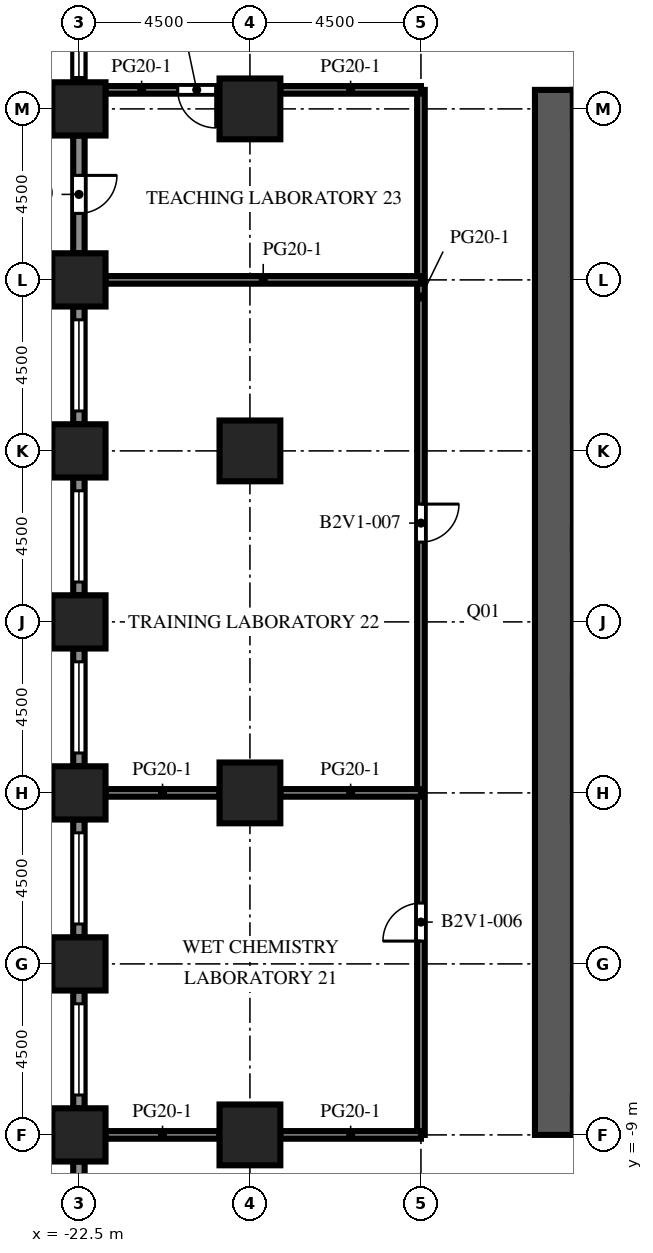
"""IFC4 building model, lengths in metres.
Left out: names, types, materials, properties, quantities, classifications, styles, units other than length and angle.
Written with IfcOpenShell. Run it as: python <this file> out.ifc"""

import sys

from ifc_helpers import new_model, si_unit, direction, frame, frame_2d, origin, origin_2d, place, context, subcontext, project, spatial, rectangle, extrude, element, fill, save


model = new_model("IFC4")
c1 = context("Model", 3, precision=1e-05, world=origin(), true_north=direction((0.0, 1.0)))
c2 = subcontext(c1, "Body", "Model", "MODEL_VIEW")
j1 = project(units=[si_unit("LENGTHUNIT", "METRE"), si_unit("PLANEANGLEUNIT", "RADIAN")], contexts=[c1])
p1 = place(None, origin())
s1 = spatial("IfcSite", under=j1, at=p1, CompositionType="ELEMENT")
p2 = place(p1, origin())
s2 = spatial("IfcBuilding", under=s1, at=p2, CompositionType="ELEMENT")
p3 = place(p2, frame((0.0, 0.0, 54.2)))
s3 = spatial("IfcBuildingStorey", under=s2, at=p3, CompositionType="ELEMENT", Elevation=54.2)
for number, where, z_axis, x_axis in (
    (1, (-22.5, -9.0, 0.0), (0.0, 0.0, 1.0), (1.0, 0.0, 0.0)),
    (2, (-22.5, -4.5, 0.0), (0.0, 0.0, 1.0), (1.0, 0.0, 0.0)),
    (3, (-22.5, 0.0, 0.0), (0.0, 0.0, 1.0), (1.0, 0.0, 0.0)),
    (4, (-22.5, 4.5, 0.0), (0.0, 0.0, 1.0), (1.0, 0.0, 0.0)),
    (5, (-22.5, 9.0, 0.0), (0.0, 0.0, 1.0), (1.0, 0.0, 0.0)),
    (6, (-22.5, 13.5, 0.0), (0.0, 0.0, 1.0), (1.0, 0.0, 0.0)),
    (7, (-22.5, 18.0, 0.0), (0.0, 0.0, 1.0), (1.0, 0.0, 0.0)),
):
    element("IfcColumn", number, at=place(p3, frame(where, z_axis=z_axis, x_axis=x_axis)), inside=s3, PredefinedType="COLUMN", context=c2, shape_type="SweptSolid", body=[
        extrude(rectangle(XDim=1.4, YDim=1.4, at=origin_2d()), origin(), (0.0, 0.0, 1.0), 4.1),
    ])
for number, where, z_axis, x_axis in (
    (8, (-18.0, -9.0, 0.0), (0.0, 0.0, 1.0), (1.0, 0.0, 0.0)),
    (9, (-18.0, 0.0, 0.0), (0.0, 0.0, 1.0), (1.0, 0.0, 0.0)),
    (10, (-18.0, 9.0, 0.0), (0.0, 0.0, 1.0), (1.0, 0.0, 0.0)),
    (11, (-18.0, 18.0, 0.0), (0.0, 0.0, 1.0), (1.0, 0.0, 0.0)),
):
    element("IfcColumn", number, at=place(p3, frame(where, z_axis=z_axis, x_axis=x_axis)), inside=s3, PredefinedType="COLUMN", context=c2, shape_type="SweptSolid", body=[
        extrude(rectangle(XDim=1.6, YDim=1.6, at=origin_2d()), origin(), (0.0, 0.0, 1.0), 4.1),
    ])
p4 = place(p3, frame((-10.0, -9.0, 0.0), z_axis=(0.0, 0.0, 1.0), x_axis=(0.0, 1.0, 0.0)))
e12 = element("IfcWall", 12, at=p4, inside=s3, PredefinedType="SHEAR", context=c2, shape_type="SweptSolid", body=[
    extrude(rectangle(XDim=27.5, YDim=1.0, at=frame_2d((13.75, 0.0))), origin(), (0.0, 0.0, 1.0), 4.1),
])
p5 = place(p4, frame((12.55, 0.0, 0.0)))
e13 = element("IfcOpeningElement", 13, at=p5, cuts=e12, PredefinedType="OPENING", context=c2, shape_type="SweptSolid", body=[
    extrude(rectangle(XDim=2.4, YDim=2.4, at=frame_2d((1.2, 1.2))), frame((0.0, 0.51, 0.0), z_axis=(0.0, -1.0, 0.0), x_axis=(1.0, 0.0, 0.0)), (0.0, 0.0, 1.0), 1.02),
])
p6 = place(p4, frame((6.825, 0.0, 0.0)))
e14 = element("IfcOpeningElement", 14, at=p6, cuts=e12, PredefinedType="OPENING", context=c2, shape_type="SweptSolid", body=[
    extrude(rectangle(XDim=1.2, YDim=2.1, at=frame_2d((0.6, 1.05))), frame((0.0, 0.51, 0.0), z_axis=(0.0, -1.0, 0.0), x_axis=(1.0, 0.0, 0.0)), (0.0, 0.0, 1.0), 1.02),
])
p7 = place(p4, frame((19.475, 0.0, 0.0)))
e15 = element("IfcOpeningElement", 15, at=p7, cuts=e12, PredefinedType="OPENING", context=c2, shape_type="SweptSolid", body=[
    extrude(rectangle(XDim=1.2, YDim=2.1, at=frame_2d((0.6, 1.05))), frame((0.0, 0.51, 0.0), z_axis=(0.0, -1.0, 0.0), x_axis=(1.0, 0.0, 0.0)), (0.0, 0.0, 1.0), 1.02),
])
p8 = place(p3, frame((-22.5, 18.7, 0.0), z_axis=(0.0, 0.0, 1.0), x_axis=(0.0, 1.0, 0.0)))
e16 = element("IfcWall", 16, at=p8, inside=s3, PredefinedType="SOLIDWALL", context=c2, shape_type="SweptSolid", body=[
    extrude(rectangle(XDim=3.1, YDim=0.3, at=frame_2d((1.55, 0.0))), origin(), (0.0, 0.0, 1.0), 2.75),
])
p9 = place(p8, frame((0.125, 0.0, 0.8)))
e17 = element("IfcOpeningElement", 17, at=p9, cuts=e16, PredefinedType="OPENING", context=c2, shape_type="SweptSolid", body=[
    extrude(rectangle(XDim=2.4, YDim=1.7, at=frame_2d((1.2, 0.85))), frame((0.0, 0.16, 0.0), z_axis=(0.0, -1.0, 0.0), x_axis=(1.0, 0.0, 0.0)), (0.0, 0.0, 1.0), 0.32),
])
p10 = place(p3, frame((-22.5, 14.2, 0.0), z_axis=(0.0, 0.0, 1.0), x_axis=(0.0, 1.0, 0.0)))
e18 = element("IfcWall", 18, at=p10, inside=s3, PredefinedType="SOLIDWALL", context=c2, shape_type="SweptSolid", body=[
    extrude(rectangle(XDim=3.1, YDim=0.3, at=frame_2d((1.55, 0.0))), origin(), (0.0, 0.0, 1.0), 2.75),
])
p11 = place(p10, frame((1.05, 0.0, 0.0)))
e19 = element("IfcOpeningElement", 19, at=p11, cuts=e18, PredefinedType="OPENING", context=c2, shape_type="SweptSolid", body=[
    extrude(rectangle(XDim=1.0, YDim=2.2, at=frame_2d((0.5, 1.1))), frame((0.0, 0.16, 0.0), z_axis=(0.0, -1.0, 0.0), x_axis=(1.0, 0.0, 0.0)), (0.0, 0.0, 1.0), 0.32),
])
p12 = place(p3, frame((-22.5, 9.7, 0.0), z_axis=(0.0, 0.0, 1.0), x_axis=(0.0, 1.0, 0.0)))
e20 = element("IfcWall", 20, at=p12, inside=s3, PredefinedType="SOLIDWALL", context=c2, shape_type="SweptSolid", body=[
    extrude(rectangle(XDim=3.1, YDim=0.3, at=frame_2d((1.55, 0.0))), origin(), (0.0, 0.0, 1.0), 2.75),
])
p13 = place(p12, frame((0.35, 0.0, 0.8)))
e21 = element("IfcOpeningElement", 21, at=p13, cuts=e20, PredefinedType="OPENING", context=c2, shape_type="SweptSolid", body=[
    extrude(rectangle(XDim=2.4, YDim=1.7, at=frame_2d((1.2, 0.85))), frame((0.0, 0.16, 0.0), z_axis=(0.0, -1.0, 0.0), x_axis=(1.0, 0.0, 0.0)), (0.0, 0.0, 1.0), 0.32),
])
p14 = place(p3, frame((-22.5, 5.2, 0.0), z_axis=(0.0, 0.0, 1.0), x_axis=(0.0, 1.0, 0.0)))
e22 = element("IfcWall", 22, at=p14, inside=s3, PredefinedType="SOLIDWALL", context=c2, shape_type="SweptSolid", body=[
    extrude(rectangle(XDim=3.1, YDim=0.3, at=frame_2d((1.55, 0.0))), origin(), (0.0, 0.0, 1.0), 2.75),
])
p15 = place(p14, frame((0.35, 0.0, 0.8)))
e23 = element("IfcOpeningElement", 23, at=p15, cuts=e22, PredefinedType="OPENING", context=c2, shape_type="SweptSolid", body=[
    extrude(rectangle(XDim=2.4, YDim=1.7, at=frame_2d((1.2, 0.85))), frame((0.0, 0.16, 0.0), z_axis=(0.0, -1.0, 0.0), x_axis=(1.0, 0.0, 0.0)), (0.0, 0.0, 1.0), 0.32),
])
p16 = place(p3, frame((-22.5, 0.7, 0.0), z_axis=(0.0, 0.0, 1.0), x_axis=(0.0, 1.0, 0.0)))
e24 = element("IfcWall", 24, at=p16, inside=s3, PredefinedType="SOLIDWALL", context=c2, shape_type="SweptSolid", body=[
    extrude(rectangle(XDim=3.1, YDim=0.3, at=frame_2d((1.55, 0.0))), origin(), (0.0, 0.0, 1.0), 2.75),
])
p17 = place(p16, frame((0.35, 0.0, 0.8)))
e25 = element("IfcOpeningElement", 25, at=p17, cuts=e24, PredefinedType="OPENING", context=c2, shape_type="SweptSolid", body=[
    extrude(rectangle(XDim=2.4, YDim=1.7, at=frame_2d((1.2, 0.85))), frame((0.0, 0.16, 0.0), z_axis=(0.0, -1.0, 0.0), x_axis=(1.0, 0.0, 0.0)), (0.0, 0.0, 1.0), 0.32),
])
p18 = place(p3, frame((-22.5, -3.8, 0.0), z_axis=(0.0, 0.0, 1.0), x_axis=(0.0, 1.0, 0.0)))
e26 = element("IfcWall", 26, at=p18, inside=s3, PredefinedType="SOLIDWALL", context=c2, shape_type="SweptSolid", body=[
    extrude(rectangle(XDim=3.1, YDim=0.3, at=frame_2d((1.55, 0.0))), origin(), (0.0, 0.0, 1.0), 2.75),
])
p19 = place(p18, frame((0.35, 0.0, 0.8)))
e27 = element("IfcOpeningElement", 27, at=p19, cuts=e26, PredefinedType="OPENING", context=c2, shape_type="SweptSolid", body=[
    extrude(rectangle(XDim=2.4, YDim=1.7, at=frame_2d((1.2, 0.85))), frame((0.0, 0.16, 0.0), z_axis=(0.0, -1.0, 0.0), x_axis=(1.0, 0.0, 0.0)), (0.0, 0.0, 1.0), 0.32),
])
p20 = place(p3, frame((-22.5, -8.3, 0.0), z_axis=(0.0, 0.0, 1.0), x_axis=(0.0, 1.0, 0.0)))
e28 = element("IfcWall", 28, at=p20, inside=s3, PredefinedType="SOLIDWALL", context=c2, shape_type="SweptSolid", body=[
    extrude(rectangle(XDim=3.1, YDim=0.3, at=frame_2d((1.55, 0.0))), origin(), (0.0, 0.0, 1.0), 2.75),
])
p21 = place(p20, frame((0.35, 0.0, 0.8)))
e29 = element("IfcOpeningElement", 29, at=p21, cuts=e28, PredefinedType="OPENING", context=c2, shape_type="SweptSolid", body=[
    extrude(rectangle(XDim=2.4, YDim=1.7, at=frame_2d((1.2, 0.85))), frame((0.0, 0.16, 0.0), z_axis=(0.0, -1.0, 0.0), x_axis=(1.0, 0.0, 0.0)), (0.0, 0.0, 1.0), 0.32),
])
p22 = place(p3, frame((-22.5, -12.8, 0.0), z_axis=(0.0, 0.0, 1.0), x_axis=(0.0, 1.0, 0.0)))
e30 = element("IfcWall", 30, at=p22, inside=s3, PredefinedType="SOLIDWALL", context=c2, shape_type="SweptSolid", body=[
    extrude(rectangle(XDim=3.1, YDim=0.3, at=frame_2d((1.55, 0.0))), origin(), (0.0, 0.0, 1.0), 2.75),
])
p23 = place(p22, frame((1.425, 0.0, 0.8)))
e31 = element("IfcOpeningElement", 31, at=p23, cuts=e30, PredefinedType="OPENING", context=c2, shape_type="SweptSolid", body=[
    extrude(rectangle(XDim=1.2, YDim=1.7, at=frame_2d((0.6, 0.85))), frame((0.0, 0.16, 0.0), z_axis=(0.0, -1.0, 0.0), x_axis=(1.0, 0.0, 0.0)), (0.0, 0.0, 1.0), 0.32),
])
p24 = place(p3, frame((-13.5, -9.0, 0.0), z_axis=(0.0, 0.0, 1.0), x_axis=(0.0, 1.0, 0.0)))
e32 = element("IfcWall", 32, at=p24, inside=s3, PredefinedType="PARTITIONING", context=c2, shape_type="SweptSolid", body=[
    extrude(rectangle(XDim=27.5, YDim=0.2, at=frame_2d((13.75, 0.0))), origin(), (0.0, 0.0, 1.0), 3.65),
])
p25 = place(p24, frame((5.1, 0.0, 0.0)))
e33 = element("IfcOpeningElement", 33, at=p25, cuts=e32, PredefinedType="OPENING", context=c2, shape_type="SweptSolid", body=[
    extrude(rectangle(XDim=1.0, YDim=2.1, at=frame_2d((0.5, 1.05))), frame((0.0, 0.11, 0.0), z_axis=(0.0, -1.0, 0.0), x_axis=(1.0, 0.0, 0.0)), (0.0, 0.0, 1.0), 0.22),
])
p26 = place(p24, frame((15.6, 0.0, 0.0)))
e34 = element("IfcOpeningElement", 34, at=p26, cuts=e32, PredefinedType="OPENING", context=c2, shape_type="SweptSolid", body=[
    extrude(rectangle(XDim=1.0, YDim=2.1, at=frame_2d((0.5, 1.05))), frame((0.0, 0.11, 0.0), z_axis=(0.0, -1.0, 0.0), x_axis=(1.0, 0.0, 0.0)), (0.0, 0.0, 1.0), 0.22),
])
p27 = place(p3, frame((-21.8, -9.0, 0.0), z_axis=(0.0, 0.0, 1.0), x_axis=(1.0, 0.0, 0.0)))
e35 = element("IfcWall", 35, at=p27, inside=s3, PredefinedType="PARTITIONING", context=c2, shape_type="SweptSolid", body=[
    extrude(rectangle(XDim=3.0, YDim=0.2, at=frame_2d((1.5, 0.0))), origin(), (0.0, 0.0, 1.0), 3.65),
])
p28 = place(p3, frame((-17.2, -9.0, 0.0), z_axis=(0.0, 0.0, 1.0), x_axis=(1.0, 0.0, 0.0)))
e36 = element("IfcWall", 36, at=p28, inside=s3, PredefinedType="PARTITIONING", context=c2, shape_type="SweptSolid", body=[
    extrude(rectangle(XDim=3.7, YDim=0.2, at=frame_2d((1.85, 0.0))), origin(), (0.0, 0.0, 1.0), 3.65),
])
p29 = place(p3, frame((-21.8, 0.0, 0.0), z_axis=(0.0, 0.0, 1.0), x_axis=(1.0, 0.0, 0.0)))
e37 = element("IfcWall", 37, at=p29, inside=s3, PredefinedType="PARTITIONING", context=c2, shape_type="SweptSolid", body=[
    extrude(rectangle(XDim=3.0, YDim=0.2, at=frame_2d((1.5, 0.0))), origin(), (0.0, 0.0, 1.0), 3.65),
])
p30 = place(p3, frame((-17.2, 0.0, 0.0), z_axis=(0.0, 0.0, 1.0), x_axis=(1.0, 0.0, 0.0)))
e38 = element("IfcWall", 38, at=p30, inside=s3, PredefinedType="PARTITIONING", context=c2, shape_type="SweptSolid", body=[
    extrude(rectangle(XDim=3.7, YDim=0.2, at=frame_2d((1.85, 0.0))), origin(), (0.0, 0.0, 1.0), 3.65),
])
p31 = place(p3, frame((-21.8, 13.5, 0.0), z_axis=(0.0, 0.0, 1.0), x_axis=(1.0, 0.0, 0.0)))
e39 = element("IfcWall", 39, at=p31, inside=s3, PredefinedType="PARTITIONING", context=c2, shape_type="SweptSolid", body=[
    extrude(rectangle(XDim=8.3, YDim=0.2, at=frame_2d((4.15, 0.0))), origin(), (0.0, 0.0, 1.0), 3.65),
])
p32 = place(p3, frame((-18.8, 18.5, 0.0), z_axis=(0.0, 0.0, 1.0), x_axis=(-1.0, 0.0, 0.0)))
e40 = element("IfcWall", 40, at=p32, inside=s3, PredefinedType="PARTITIONING", context=c2, shape_type="SweptSolid", body=[
    extrude(rectangle(XDim=3.0, YDim=0.2, at=frame_2d((1.5, 0.0))), origin(), (0.0, 0.0, 1.0), 3.65),
])
p33 = place(p32, frame((0.1, 0.0, 0.0)))
e41 = element("IfcOpeningElement", 41, at=p33, cuts=e40, PredefinedType="OPENING", context=c2, shape_type="SweptSolid", body=[
    extrude(rectangle(XDim=1.0, YDim=2.1, at=frame_2d((0.5, 1.05))), frame((0.0, 0.11, 0.0), z_axis=(0.0, -1.0, 0.0), x_axis=(1.0, 0.0, 0.0)), (0.0, 0.0, 1.0), 0.22),
])
p34 = place(p3, frame((-17.2, 18.5, 0.0), z_axis=(0.0, 0.0, 1.0), x_axis=(1.0, 0.0, 0.0)))
e42 = element("IfcWall", 42, at=p34, inside=s3, PredefinedType="PARTITIONING", context=c2, shape_type="SweptSolid", body=[
    extrude(rectangle(XDim=3.7, YDim=0.2, at=frame_2d((1.85, 0.0))), origin(), (0.0, 0.0, 1.0), 3.65),
])
p35 = place(p9, origin())
e43 = element("IfcWindow", 43, at=p35, inside=s3, PartitioningType="SINGLE_PANEL", PredefinedType="WINDOW", context=c2, shape_type="SweptSolid", body=[
    extrude(rectangle(XDim=2.4, YDim=1.7, at=frame_2d((1.2, 0.85))), frame((0.0, 0.03, 0.0), z_axis=(0.0, -1.0, 0.0), x_axis=(1.0, 0.0, 0.0)), (0.0, 0.0, 1.0), 0.06),
])
fill(e17, e43)
p36 = place(p11, origin())
e44 = element("IfcDoor", 44, at=p36, inside=s3, OperationType="SINGLE_SWING_RIGHT", PredefinedType="DOOR", context=c2, shape_type="SweptSolid", body=[
    extrude(rectangle(XDim=1.0, YDim=2.2, at=frame_2d((0.5, 1.1))), frame((0.0, 0.025, 0.0), z_axis=(0.0, -1.0, 0.0), x_axis=(1.0, 0.0, 0.0)), (0.0, 0.0, 1.0), 0.05),
])
fill(e19, e44)
p37 = place(p13, origin())
e45 = element("IfcWindow", 45, at=p37, inside=s3, PartitioningType="SINGLE_PANEL", PredefinedType="WINDOW", context=c2, shape_type="SweptSolid", body=[
    extrude(rectangle(XDim=2.4, YDim=1.7, at=frame_2d((1.2, 0.85))), frame((0.0, 0.03, 0.0), z_axis=(0.0, -1.0, 0.0), x_axis=(1.0, 0.0, 0.0)), (0.0, 0.0, 1.0), 0.06),
])
fill(e21, e45)
p38 = place(p15, origin())
e46 = element("IfcWindow", 46, at=p38, inside=s3, PartitioningType="SINGLE_PANEL", PredefinedType="WINDOW", context=c2, shape_type="SweptSolid", body=[
    extrude(rectangle(XDim=2.4, YDim=1.7, at=frame_2d((1.2, 0.85))), frame((0.0, 0.03, 0.0), z_axis=(0.0, -1.0, 0.0), x_axis=(1.0, 0.0, 0.0)), (0.0, 0.0, 1.0), 0.06),
])
fill(e23, e46)
p39 = place(p17, origin())
e47 = element("IfcWindow", 47, at=p39, inside=s3, PartitioningType="SINGLE_PANEL", PredefinedType="WINDOW", context=c2, shape_type="SweptSolid", body=[
    extrude(rectangle(XDim=2.4, YDim=1.7, at=frame_2d((1.2, 0.85))), frame((0.0, 0.03, 0.0), z_axis=(0.0, -1.0, 0.0), x_axis=(1.0, 0.0, 0.0)), (0.0, 0.0, 1.0), 0.06),
])
fill(e25, e47)
p40 = place(p19, origin())
e48 = element("IfcWindow", 48, at=p40, inside=s3, PartitioningType="SINGLE_PANEL", PredefinedType="WINDOW", context=c2, shape_type="SweptSolid", body=[
    extrude(rectangle(XDim=2.4, YDim=1.7, at=frame_2d((1.2, 0.85))), frame((0.0, 0.03, 0.0), z_axis=(0.0, -1.0, 0.0), x_axis=(1.0, 0.0, 0.0)), (0.0, 0.0, 1.0), 0.06),
])
fill(e27, e48)
p41 = place(p21, origin())
e49 = element("IfcWindow", 49, at=p41, inside=s3, PartitioningType="SINGLE_PANEL", PredefinedType="WINDOW", context=c2, shape_type="SweptSolid", body=[
    extrude(rectangle(XDim=2.4, YDim=1.7, at=frame_2d((1.2, 0.85))), frame((0.0, 0.03, 0.0), z_axis=(0.0, -1.0, 0.0), x_axis=(1.0, 0.0, 0.0)), (0.0, 0.0, 1.0), 0.06),
])
fill(e29, e49)
p42 = place(p5, origin())
e50 = element("IfcDoor", 50, at=p42, inside=s3, OperationType="DOUBLE_DOOR_DOUBLE_SWING", PredefinedType="DOOR", context=c2, shape_type="SweptSolid", body=[
    extrude(rectangle(XDim=2.4, YDim=2.4, at=frame_2d((1.2, 1.2))), frame((0.0, 0.025, 0.0), z_axis=(0.0, -1.0, 0.0), x_axis=(1.0, 0.0, 0.0)), (0.0, 0.0, 1.0), 0.05),
])
fill(e13, e50)
p43 = place(p6, origin())
e51 = element("IfcDoor", 51, at=p43, inside=s3, OperationType="SINGLE_SWING_LEFT", PredefinedType="DOOR", context=c2, shape_type="SweptSolid", body=[
    extrude(rectangle(XDim=1.2, YDim=2.1, at=frame_2d((0.6, 1.05))), frame((0.0, 0.025, 0.0), z_axis=(0.0, -1.0, 0.0), x_axis=(1.0, 0.0, 0.0)), (0.0, 0.0, 1.0), 0.05),
])
fill(e14, e51)
p44 = place(p7, origin())
e52 = element("IfcDoor", 52, at=p44, inside=s3, OperationType="SINGLE_SWING_LEFT", PredefinedType="DOOR", context=c2, shape_type="SweptSolid", body=[
    extrude(rectangle(XDim=1.2, YDim=2.1, at=frame_2d((0.6, 1.05))), frame((0.0, 0.025, 0.0), z_axis=(0.0, -1.0, 0.0), x_axis=(1.0, 0.0, 0.0)), (0.0, 0.0, 1.0), 0.05),
])
fill(e15, e52)
p45 = place(p25, origin())
e53 = element("IfcDoor", 53, at=p45, inside=s3, OperationType="SINGLE_SWING_LEFT", PredefinedType="DOOR", context=c2, shape_type="SweptSolid", body=[
    extrude(rectangle(XDim=1.0, YDim=2.1, at=frame_2d((0.5, 1.05))), frame((0.0, 0.025, 0.0), z_axis=(0.0, -1.0, 0.0), x_axis=(1.0, 0.0, 0.0)), (0.0, 0.0, 1.0), 0.05),
])
fill(e33, e53)
p46 = place(p26, origin())
e54 = element("IfcDoor", 54, at=p46, inside=s3, OperationType="SINGLE_SWING_RIGHT", PredefinedType="DOOR", context=c2, shape_type="SweptSolid", body=[
    extrude(rectangle(XDim=1.0, YDim=2.1, at=frame_2d((0.5, 1.05))), frame((0.0, 0.025, 0.0), z_axis=(0.0, -1.0, 0.0), x_axis=(1.0, 0.0, 0.0)), (0.0, 0.0, 1.0), 0.05),
])
fill(e34, e54)
p47 = place(p33, origin())
e55 = element("IfcDoor", 55, at=p47, inside=s3, OperationType="SINGLE_SWING_LEFT", PredefinedType="DOOR", context=c2, shape_type="SweptSolid", body=[
    extrude(rectangle(XDim=1.0, YDim=2.1, at=frame_2d((0.5, 1.05))), frame((0.0, 0.025, 0.0), z_axis=(0.0, -1.0, 0.0), x_axis=(1.0, 0.0, 0.0)), (0.0, 0.0, 1.0), 0.05),
])
fill(e41, e55)
save(model, sys.argv[1])
